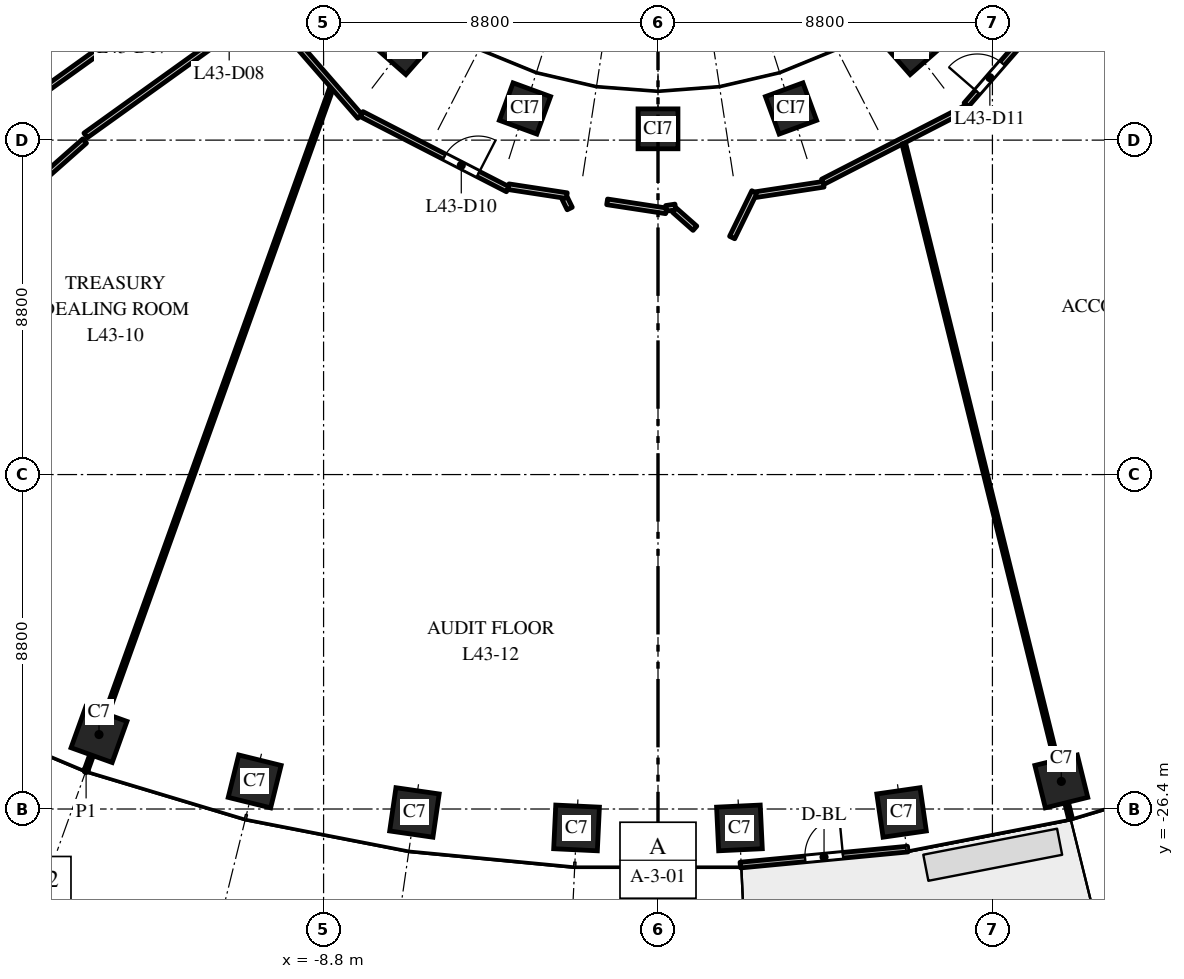
"""IFC4 building model, lengths in metres.
Left out: names, types, materials, properties, quantities, classifications, styles, units other than length and angle.
Written with IfcOpenShell. Run it as: python <this file> out.ifc"""

import sys

from ifc_helpers import new_model, si_unit, direction, frame, frame_2d, origin, origin_2d, place, context, subcontext, project, spatial, rectangle, extrude, element, fill, save


model = new_model("IFC4")
c1 = context("Model", 3, precision=1e-05, world=origin(), true_north=direction((0.0, 1.0)))
c2 = subcontext(c1, "Body", "Model", "MODEL_VIEW")
j1 = project(units=[si_unit("LENGTHUNIT", "METRE"), si_unit("PLANEANGLEUNIT", "RADIAN")], contexts=[c1])
p1 = place(None, origin())
s1 = spatial("IfcSite", under=j1, at=p1, CompositionType="ELEMENT")
p2 = place(p1, origin())
s2 = spatial("IfcBuilding", under=s1, at=p2, CompositionType="ELEMENT")
p3 = place(p2, frame((0.0, 0.0, 186.0)))
s3 = spatial("IfcBuildingStorey", under=s2, at=p3, CompositionType="ELEMENT", Elevation=186.0)
for number, where, z_axis, x_axis in (
    (1, (-14.709, -24.441, 0.0), (0.0, 0.0, 1.0), (0.941, -0.338, 0.0)),
    (2, (-10.613, -25.674, 0.0), (0.0, 0.0, 1.0), (0.971, -0.24, 0.0)),
    (3, (-6.409, -26.491, 0.0), (0.0, 0.0, 1.0), (0.99, -0.143, 0.0)),
    (4, (-2.143, -26.898, 0.0), (0.0, 0.0, 1.0), (0.999, -0.048, 0.0)),
    (5, (2.143, -26.898, 0.0), (0.0, 0.0, 1.0), (0.999, 0.048, 0.0)),
    (6, (6.409, -26.491, 0.0), (0.0, 0.0, 1.0), (0.99, 0.143, 0.0)),
    (7, (10.613, -25.674, 0.0), (0.0, 0.0, 1.0), (0.971, 0.24, 0.0)),
):
    element("IfcColumn", number, at=place(p3, frame(where, z_axis=z_axis, x_axis=x_axis)), inside=s3, PredefinedType="COLUMN", context=c2, shape_type="SweptSolid", body=[
        extrude(rectangle(XDim=1.15, YDim=1.15, at=origin_2d()), origin(), (0.0, 0.0, 1.0), 4.0),
    ])
for number, where, z_axis, x_axis in (
    (8, (-6.682, -6.334, 0.0), (0.0, 0.0, 1.0), (0.751, -0.66, 0.0)),
    (9, (-3.501, -7.967, 0.0), (0.0, 0.0, 1.0), (0.939, -0.344, 0.0)),
    (10, (0.0, -8.503, 0.0), (0.0, 0.0, 1.0), (1.0, 0.0, 0.0)),
    (11, (3.501, -7.967, 0.0), (0.0, 0.0, 1.0), (0.939, 0.344, 0.0)),
    (12, (6.682, -6.334, 0.0), (0.0, 0.0, 1.0), (0.751, 0.66, 0.0)),
):
    element("IfcColumn", number, at=place(p3, frame(where, z_axis=z_axis, x_axis=x_axis)), inside=s3, PredefinedType="COLUMN", context=c2, shape_type="SweptSolid", body=[
        extrude(rectangle(XDim=1.05, YDim=1.05, at=origin_2d()), origin(), (0.0, 0.0, 1.0), 4.0),
    ])
p4 = place(p3, frame((2.166, -27.875, 0.0), z_axis=(0.0, 0.0, 1.0), x_axis=(0.995473879823, 0.095035543824, 0.0)))
e13 = element("IfcWall", 13, at=p4, inside=s3, PredefinedType="STANDARD", context=c2, shape_type="SweptSolid", body=[
    extrude(rectangle(XDim=4.426, YDim=0.15, at=frame_2d((2.213, 0.0))), origin(), (0.0, 0.0, 1.0), 3.7),
])
p5 = place(p4, frame((1.713, 0.0, 0.0)))
e14 = element("IfcOpeningElement", 14, at=p5, cuts=e13, PredefinedType="OPENING", context=c2, shape_type="SweptSolid", body=[
    extrude(rectangle(XDim=1.0, YDim=2.4, at=frame_2d((0.5, 1.2))), frame((0.0, 0.085, 0.0), z_axis=(0.0, -1.0, 0.0), x_axis=(1.0, 0.0, 0.0)), (0.0, 0.0, 1.0), 0.17),
])
p6 = place(p3, frame((-16.5, -7.739, 0.0), z_axis=(0.0, 0.0, 1.0), x_axis=(0.812415179651, 0.583079390712, 0.0)))
e15 = element("IfcWall", 15, at=p6, inside=s3, PredefinedType="PARTITIONING", context=c2, shape_type="SweptSolid", body=[
    extrude(rectangle(XDim=6.68, YDim=0.15, at=frame_2d((3.34, 0.0))), origin(), (0.0, 0.0, 1.0), 3.7),
])
p7 = place(p6, frame((3.45, 0.0, 0.0)))
e16 = element("IfcOpeningElement", 16, at=p7, cuts=e15, PredefinedType="OPENING", context=c2, shape_type="SweptSolid", body=[
    extrude(rectangle(XDim=1.0, YDim=2.1, at=frame_2d((0.5, 1.05))), frame((0.0, 0.085, 0.0), z_axis=(0.0, -1.0, 0.0), x_axis=(1.0, 0.0, 0.0)), (0.0, 0.0, 1.0), 0.17),
])
p8 = place(p3, frame((-15.062, -8.676, 0.0), z_axis=(0.0, 0.0, 1.0), x_axis=(0.812494026232, 0.582969516645, 0.0)))
e17 = element("IfcWall", 17, at=p8, inside=s3, PredefinedType="PARTITIONING", context=c2, shape_type="SweptSolid", body=[
    extrude(rectangle(XDim=5.798, YDim=0.15, at=frame_2d((2.899, 0.0))), origin(), (0.0, 0.0, 1.0), 3.7),
])
p9 = place(p8, frame((4.15, 0.0, 0.0)))
e18 = element("IfcOpeningElement", 18, at=p9, cuts=e17, PredefinedType="OPENING", context=c2, shape_type="SweptSolid", body=[
    extrude(rectangle(XDim=1.0, YDim=2.1, at=frame_2d((0.5, 1.05))), frame((0.0, 0.085, 0.0), z_axis=(0.0, -1.0, 0.0), x_axis=(1.0, 0.0, 0.0)), (0.0, 0.0, 1.0), 0.17),
])
p10 = place(p3, frame((-15.049, -25.383, 0.0), z_axis=(0.0, 0.0, 1.0), x_axis=(0.338407677895, 0.940999598056, 0.0)))
e19 = element("IfcWall", 19, at=p10, inside=s3, PredefinedType="PARTITIONING", context=c2, shape_type="SweptSolid", body=[
    extrude(rectangle(XDim=19.078, YDim=0.1, at=frame_2d((9.539, 0.0))), origin(), (0.0, 0.0, 1.0), 2.85),
])
p11 = place(p3, frame((-10.351, -5.296, 0.0), z_axis=(0.0, 0.0, 1.0), x_axis=(0.656297424411, -0.754502280124, 0.0)))
e20 = element("IfcWall", 20, at=p11, inside=s3, PredefinedType="PARTITIONING", context=c2, shape_type="SweptSolid", body=[
    extrude(rectangle(XDim=3.819, YDim=0.15, at=frame_2d((1.909, 0.0))), origin(), (0.0, 0.0, 1.0), 2.75),
])
p12 = place(p3, frame((-7.798, -8.116, 0.0), z_axis=(0.0, 0.0, 1.0), x_axis=(0.889319313061, -0.457286736542, 0.0)))
e21 = element("IfcWall", 21, at=p12, inside=s3, PredefinedType="PARTITIONING", context=c2, shape_type="SweptSolid", body=[
    extrude(rectangle(XDim=4.321, YDim=0.15, at=frame_2d((2.161, 0.0))), origin(), (0.0, 0.0, 1.0), 2.85),
])
p13 = place(p12, frame((2.448, 0.0, 0.0)))
e22 = element("IfcOpeningElement", 22, at=p13, cuts=e21, PredefinedType="OPENING", context=c2, shape_type="SweptSolid", body=[
    extrude(rectangle(XDim=1.0, YDim=2.1, at=frame_2d((0.5, 1.05))), frame((0.0, 0.085, 0.0), z_axis=(0.0, -1.0, 0.0), x_axis=(1.0, 0.0, 0.0)), (0.0, 0.0, 1.0), 0.17),
])
p14 = place(p3, frame((-3.934, -10.026, 0.0), z_axis=(0.0, 0.0, 1.0), x_axis=(0.988475056892, -0.151383823121, 0.0)))
e23 = element("IfcWall", 23, at=p14, inside=s3, PredefinedType="PARTITIONING", context=c2, shape_type="SweptSolid", body=[
    extrude(rectangle(XDim=1.553, YDim=0.15, at=frame_2d((0.776, 0.0))), origin(), (0.0, 0.0, 1.0), 3.7),
])
p15 = place(p3, frame((-2.456, -10.328, 0.0), z_axis=(0.0, 0.0, 1.0), x_axis=(0.439137872532, -0.898419684172, 0.0)))
e24 = element("IfcWall", 24, at=p15, inside=s3, PredefinedType="PARTITIONING", context=c2, shape_type="SweptSolid", body=[
    extrude(rectangle(XDim=0.303, YDim=0.15, at=frame_2d((0.151, 0.0))), origin(), (0.0, 0.0, 1.0), 3.7),
])
p16 = place(p3, frame((-1.339, -10.424, 0.0), z_axis=(0.0, 0.0, 1.0), x_axis=(0.988543752216, -0.150934588328, 0.0)))
e25 = element("IfcWall", 25, at=p16, inside=s3, PredefinedType="PARTITIONING", context=c2, shape_type="SweptSolid", body=[
    extrude(rectangle(XDim=1.569, YDim=0.15, at=frame_2d((0.785, 0.0))), origin(), (0.0, 0.0, 1.0), 2.85),
])
p17 = place(p3, frame((0.212, -10.596, 0.0), z_axis=(0.0, 0.0, 1.0), x_axis=(0.988383030612, 0.151983501731, 0.0)))
e26 = element("IfcWall", 26, at=p17, inside=s3, PredefinedType="PARTITIONING", context=c2, shape_type="SweptSolid", body=[
    extrude(rectangle(XDim=0.249, YDim=0.15, at=frame_2d((0.125, 0.0))), origin(), (0.0, 0.0, 1.0), 3.7),
])
p18 = place(p3, frame((0.432, -10.642, 0.0), z_axis=(0.0, 0.0, 1.0), x_axis=(0.749630131406, -0.661856983108, 0.0)))
e27 = element("IfcWall", 27, at=p18, inside=s3, PredefinedType="PARTITIONING", context=c2, shape_type="SweptSolid", body=[
    extrude(rectangle(XDim=0.72, YDim=0.15, at=frame_2d((0.36, 0.0))), origin(), (0.0, 0.0, 1.0), 3.7),
])
p19 = place(p3, frame((1.951, -11.363, 0.0), z_axis=(0.0, 0.0, 1.0), x_axis=(0.438481320521, 0.89874030262, 0.0)))
e28 = element("IfcWall", 28, at=p19, inside=s3, PredefinedType="PARTITIONING", context=c2, shape_type="SweptSolid", body=[
    extrude(rectangle(XDim=1.334, YDim=0.15, at=frame_2d((0.667, 0.0))), origin(), (0.0, 0.0, 1.0), 2.85),
])
p20 = place(p3, frame((2.579, -10.233, 0.0), z_axis=(0.0, 0.0, 1.0), x_axis=(0.988593378539, 0.150609202605, 0.0)))
e29 = element("IfcWall", 29, at=p20, inside=s3, PredefinedType="PARTITIONING", context=c2, shape_type="SweptSolid", body=[
    extrude(rectangle(XDim=1.799, YDim=0.15, at=frame_2d((0.9, 0.0))), origin(), (0.0, 0.0, 1.0), 3.7),
])
p21 = place(p3, frame((4.337, -9.896, 0.0), z_axis=(0.0, 0.0, 1.0), x_axis=(0.889382211946, 0.457164391739, 0.0)))
e30 = element("IfcWall", 30, at=p21, inside=s3, PredefinedType="PARTITIONING", context=c2, shape_type="SweptSolid", body=[
    extrude(rectangle(XDim=4.296, YDim=0.15, at=frame_2d((2.148, 0.0))), origin(), (0.0, 0.0, 1.0), 2.85),
])
p22 = place(p3, frame((6.467, -8.889, 0.0), z_axis=(0.0, 0.0, 1.0), x_axis=(0.239792865419, -0.970824073504, 0.0)))
e31 = element("IfcWall", 31, at=p22, inside=s3, PredefinedType="PARTITIONING", context=c2, shape_type="SweptSolid", body=[
    extrude(rectangle(XDim=18.291, YDim=0.1, at=frame_2d((9.146, 0.0))), origin(), (0.0, 0.0, 1.0), 2.85),
])
p23 = place(p3, frame((8.111, -7.871, 0.0), z_axis=(0.0, 0.0, 1.0), x_axis=(0.656293818527, 0.754505416656, 0.0)))
e32 = element("IfcWall", 32, at=p23, inside=s3, PredefinedType="PARTITIONING", context=c2, shape_type="SweptSolid", body=[
    extrude(rectangle(XDim=3.413, YDim=0.15, at=frame_2d((1.707, 0.0))), origin(), (0.0, 0.0, 1.0), 2.75),
])
p24 = place(p23, frame((0.447, 0.0, 0.0)))
e33 = element("IfcOpeningElement", 33, at=p24, cuts=e32, PredefinedType="OPENING", context=c2, shape_type="SweptSolid", body=[
    extrude(rectangle(XDim=1.0, YDim=2.1, at=frame_2d((0.5, 1.05))), frame((0.0, 0.085, 0.0), z_axis=(0.0, -1.0, 0.0), x_axis=(1.0, 0.0, 0.0)), (0.0, 0.0, 1.0), 0.17),
])
p25 = place(p3, frame((10.351, -5.296, 0.0), z_axis=(0.0, 0.0, 1.0), x_axis=(0.812494026232, -0.582969516645, 0.0)))
e34 = element("IfcWall", 34, at=p25, inside=s3, PredefinedType="PARTITIONING", context=c2, shape_type="SweptSolid", body=[
    extrude(rectangle(XDim=5.798, YDim=0.15, at=frame_2d((2.899, 0.0))), origin(), (0.0, 0.0, 1.0), 2.75),
])
p26 = place(p3, frame((11.203, -3.938, 0.0), z_axis=(0.0, 0.0, 1.0), x_axis=(0.812471543061, -0.583000850528, 0.0)))
e35 = element("IfcWall", 35, at=p26, inside=s3, PredefinedType="PARTITIONING", context=c2, shape_type="SweptSolid", body=[
    extrude(rectangle(XDim=6.52, YDim=0.15, at=frame_2d((3.26, 0.0))), origin(), (0.0, 0.0, 1.0), 3.7),
])
p27 = place(p26, frame((4.0, 0.0, 0.0)))
e36 = element("IfcOpeningElement", 36, at=p27, cuts=e35, PredefinedType="OPENING", context=c2, shape_type="SweptSolid", body=[
    extrude(rectangle(XDim=1.0, YDim=2.1, at=frame_2d((0.5, 1.05))), frame((0.0, 0.085, 0.0), z_axis=(0.0, -1.0, 0.0), x_axis=(1.0, 0.0, 0.0)), (0.0, 0.0, 1.0), 0.17),
])
p28 = place(p3, frame((-15.088, -8.824, 0.0), z_axis=(0.0, 0.0, 1.0), x_axis=(-0.749107006374, -0.662449011624, 0.0)))
e37 = element("IfcWall", 37, at=p28, inside=s3, PredefinedType="PARTITIONING", context=c2, shape_type="SweptSolid", body=[
    extrude(rectangle(XDim=1.688, YDim=0.15, at=frame_2d((0.844, 0.0))), origin(), (0.0, 0.0, 1.0), 3.7),
])
p29 = place(p5, origin())
e38 = element("IfcDoor", 38, at=p29, inside=s3, OperationType="SINGLE_SWING_RIGHT", PredefinedType="DOOR", context=c2, shape_type="SweptSolid", body=[
    extrude(rectangle(XDim=1.0, YDim=2.4, at=frame_2d((0.5, 1.2))), frame((0.0, 0.025, 0.0), z_axis=(0.0, -1.0, 0.0), x_axis=(1.0, 0.0, 0.0)), (0.0, 0.0, 1.0), 0.05),
])
fill(e14, e38)
p30 = place(p13, origin())
e39 = element("IfcDoor", 39, at=p30, inside=s3, OperationType="SINGLE_SWING_RIGHT", PredefinedType="DOOR", context=c2, shape_type="SweptSolid", body=[
    extrude(rectangle(XDim=1.0, YDim=2.1, at=frame_2d((0.5, 1.05))), frame((0.0, 0.025, 0.0), z_axis=(0.0, -1.0, 0.0), x_axis=(1.0, 0.0, 0.0)), (0.0, 0.0, 1.0), 0.05),
])
fill(e22, e39)
p31 = place(p24, origin())
e40 = element("IfcDoor", 40, at=p31, inside=s3, OperationType="SINGLE_SWING_LEFT", PredefinedType="DOOR", context=c2, shape_type="SweptSolid", body=[
    extrude(rectangle(XDim=1.0, YDim=2.1, at=frame_2d((0.5, 1.05))), frame((0.0, 0.025, 0.0), z_axis=(0.0, -1.0, 0.0), x_axis=(1.0, 0.0, 0.0)), (0.0, 0.0, 1.0), 0.05),
])
fill(e33, e40)
save(model, sys.argv[1])
